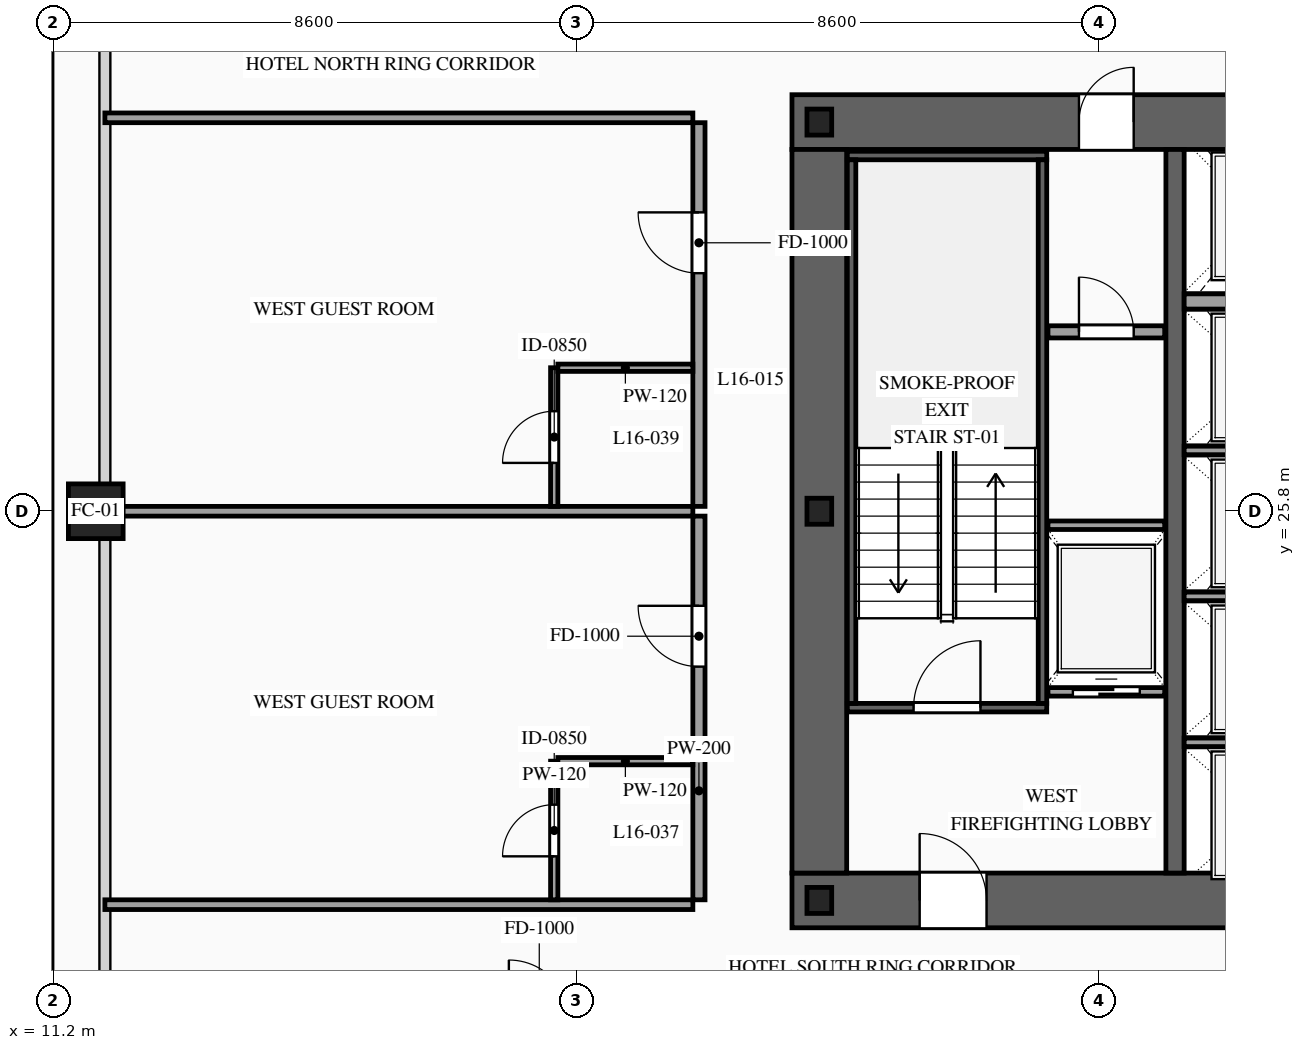
"""IFC4 building model, lengths in metres.
Left out: names, types, materials, properties, quantities, classifications, styles, units other than length and angle.
Written with IfcOpenShell. Run it as: python <this file> out.ifc"""

import sys

from ifc_helpers import new_model, si_unit, direction, frame, frame_2d, origin, origin_2d, place, context, subcontext, project, spatial, rectangle, hollow_rectangle, i_section, extrude, source, transform, mapped, element, fill, save


model = new_model("IFC4")
c1 = context("Model", 3, precision=1e-05, world=origin(), true_north=direction((0.0, 1.0)))
c2 = subcontext(c1, "Body", "Model", "MODEL_VIEW")
j1 = project(units=[si_unit("LENGTHUNIT", "METRE"), si_unit("PLANEANGLEUNIT", "RADIAN")], contexts=[c1])
p1 = place(None, origin())
s1 = spatial("IfcSite", under=j1, at=p1, CompositionType="ELEMENT")
p2 = place(p1, origin())
s2 = spatial("IfcBuilding", under=s1, at=p2, CompositionType="ELEMENT")
p3 = place(p2, frame((0.0, 0.0, 64.0)))
s3 = spatial("IfcBuildingStorey", under=s2, at=p3, CompositionType="ELEMENT", Elevation=64.0)
p4 = place(p3, frame((23.35, 19.4, 0.0), z_axis=(0.0, 0.0, 1.0), x_axis=(1.0, 0.0, 0.0)))
e1 = element("IfcWall", 1, at=p4, inside=s3, PredefinedType="SHEAR", context=c2, shape_type="SweptSolid", body=[
    extrude(rectangle(XDim=27.3, YDim=0.9, at=frame_2d((13.65, 0.0))), origin(), (0.0, 0.0, 1.0), 3.6),
])
p5 = place(p4, frame((2.1, 0.0, 0.0)))
e2 = element("IfcOpeningElement", 2, at=p5, cuts=e1, PredefinedType="OPENING", context=c2, shape_type="SweptSolid", body=[
    extrude(rectangle(XDim=1.1, YDim=2.2, at=frame_2d((0.55, 1.1))), frame((0.0, 0.465, 0.0), z_axis=(0.0, -1.0, 0.0), x_axis=(1.0, 0.0, 0.0)), (0.0, 0.0, 1.0), 0.93),
])
p6 = place(p4, frame((10.0, 0.0, 0.0)))
e3 = element("IfcOpeningElement", 3, at=p6, cuts=e1, PredefinedType="OPENING", context=c2, shape_type="SweptSolid", body=[
    extrude(rectangle(XDim=1.1, YDim=2.2, at=frame_2d((0.55, 1.1))), frame((0.0, 0.465, 0.0), z_axis=(0.0, -1.0, 0.0), x_axis=(1.0, 0.0, 0.0)), (0.0, 0.0, 1.0), 0.93),
])
p7 = place(p4, frame((23.2, 0.0, 0.0)))
e4 = element("IfcOpeningElement", 4, at=p7, cuts=e1, PredefinedType="OPENING", context=c2, shape_type="SweptSolid", body=[
    extrude(rectangle(XDim=1.1, YDim=2.2, at=frame_2d((0.55, 1.1))), frame((0.0, 0.465, 0.0), z_axis=(0.0, -1.0, 0.0), x_axis=(1.0, 0.0, 0.0)), (0.0, 0.0, 1.0), 0.93),
])
p8 = place(p4, frame((19.82, 0.0, 0.0)))
e5 = element("IfcOpeningElement", 5, at=p8, cuts=e1, PredefinedType="OPENING", context=c2, shape_type="SweptSolid", body=[
    extrude(rectangle(XDim=0.9, YDim=2.15, at=frame_2d((0.45, 1.075))), frame((0.0, 0.465, 0.0), z_axis=(0.0, -1.0, 0.0), x_axis=(1.0, 0.0, 0.0)), (0.0, 0.0, 1.0), 0.93),
])
p9 = place(p4, frame((18.38, 0.0, 0.0)))
e6 = element("IfcOpeningElement", 6, at=p9, cuts=e1, PredefinedType="OPENING", context=c2, shape_type="SweptSolid", body=[
    extrude(rectangle(XDim=0.9, YDim=2.15, at=frame_2d((0.45, 1.075))), frame((0.0, 0.465, 0.0), z_axis=(0.0, -1.0, 0.0), x_axis=(1.0, 0.0, 0.0)), (0.0, 0.0, 1.0), 0.93),
])
p10 = place(p3, frame((23.35, 32.2, 0.0), z_axis=(0.0, 0.0, 1.0), x_axis=(1.0, 0.0, 0.0)))
e7 = element("IfcWall", 7, at=p10, inside=s3, PredefinedType="SHEAR", context=c2, shape_type="SweptSolid", body=[
    extrude(rectangle(XDim=27.3, YDim=0.9, at=frame_2d((13.65, 0.0))), origin(), (0.0, 0.0, 1.0), 3.6),
])
p11 = place(p10, frame((4.72, 0.0, 0.0)))
e8 = element("IfcOpeningElement", 8, at=p11, cuts=e7, PredefinedType="OPENING", context=c2, shape_type="SweptSolid", body=[
    extrude(rectangle(XDim=0.9, YDim=2.15, at=frame_2d((0.45, 1.075))), frame((0.0, 0.465, 0.0), z_axis=(0.0, -1.0, 0.0), x_axis=(1.0, 0.0, 0.0)), (0.0, 0.0, 1.0), 0.93),
])
p12 = place(p10, frame((10.0, 0.0, 0.0)))
e9 = element("IfcOpeningElement", 9, at=p12, cuts=e7, PredefinedType="OPENING", context=c2, shape_type="SweptSolid", body=[
    extrude(rectangle(XDim=1.1, YDim=2.2, at=frame_2d((0.55, 1.1))), frame((0.0, 0.465, 0.0), z_axis=(0.0, -1.0, 0.0), x_axis=(1.0, 0.0, 0.0)), (0.0, 0.0, 1.0), 0.93),
])
p13 = place(p10, frame((15.85, 0.0, 0.0)))
e10 = element("IfcOpeningElement", 10, at=p13, cuts=e7, PredefinedType="OPENING", context=c2, shape_type="SweptSolid", body=[
    extrude(rectangle(XDim=1.1, YDim=2.2, at=frame_2d((0.55, 1.1))), frame((0.0, 0.465, 0.0), z_axis=(0.0, -1.0, 0.0), x_axis=(1.0, 0.0, 0.0)), (0.0, 0.0, 1.0), 0.93),
])
p14 = place(p10, frame((19.82, 0.0, 0.0)))
e11 = element("IfcOpeningElement", 11, at=p14, cuts=e7, PredefinedType="OPENING", context=c2, shape_type="SweptSolid", body=[
    extrude(rectangle(XDim=0.9, YDim=2.15, at=frame_2d((0.45, 1.075))), frame((0.0, 0.465, 0.0), z_axis=(0.0, -1.0, 0.0), x_axis=(1.0, 0.0, 0.0)), (0.0, 0.0, 1.0), 0.93),
])
m1 = source(origin(), c2, "Body", "SweptSolid", [
    extrude(rectangle(XDim=11.9, YDim=0.9, at=frame_2d((5.95, 0.0))), origin(), (0.0, 0.0, 1.0), 3.6),
])
p15 = place(p3, frame((23.8, 19.85, 0.0), z_axis=(0.0, 0.0, 1.0), x_axis=(0.0, 1.0, 0.0)))
e12 = element("IfcWall", 12, at=p15, inside=s3, PredefinedType="SHEAR", context=c2, shape_type="MappedRepresentation", body=[
    mapped(m1, transform((0.0, 0.0, 0.0), scale=1.0)),
])
m2 = source(origin(), c2, "Body", "SweptSolid", [
    extrude(rectangle(XDim=11.9, YDim=0.3, at=frame_2d((5.95, 0.0))), origin(), (0.0, 0.0, 1.0), 3.6),
])
p16 = place(p3, frame((29.65, 19.85, 0.0), z_axis=(0.0, 0.0, 1.0), x_axis=(0.0, 1.0, 0.0)))
e13 = element("IfcWall", 13, at=p16, inside=s3, PredefinedType="SOLIDWALL", context=c2, shape_type="MappedRepresentation", body=[
    mapped(m2, transform((0.0, 0.0, 0.0), scale=1.0)),
])
m3 = source(origin(), c2, "Body", "SweptSolid", [
    extrude(i_section(OverallWidth=0.407, OverallDepth=0.428, WebThickness=0.02, FlangeThickness=0.035, at=origin_2d()), origin(), (0.0, 0.0, 1.0), 3.6),
])
for number, where, z_axis, x_axis in (
    (14, (23.8, 19.4, 0.0), (0.0, 0.0, 1.0), (1.0, 0.0, 0.0)),
    (15, (23.8, 25.8, 0.0), (0.0, 0.0, 1.0), (1.0, 0.0, 0.0)),
    (16, (23.8, 32.2, 0.0), (0.0, 0.0, 1.0), (1.0, 0.0, 0.0)),
):
    element("IfcColumn", number, at=place(p3, frame(where, z_axis=z_axis, x_axis=x_axis)), inside=s3, PredefinedType="COLUMN", context=c2, shape_type="MappedRepresentation", body=[
        mapped(m3, transform((0.0, 0.0, 0.0), scale=1.0)),
    ])
m4 = source(origin(), c2, "Body", "SweptSolid", [
    extrude(hollow_rectangle(XDim=0.9, YDim=0.9, WallThickness=0.042, at=origin_2d()), origin(), (0.0, 0.0, 1.0), 3.6),
])
p17 = place(p3, frame((11.9, 25.8, 0.0), z_axis=(0.0, 0.0, 1.0), x_axis=(1.0, 0.0, 0.0)))
e17 = element("IfcColumn", 17, at=p17, inside=s3, PredefinedType="COLUMN", context=c2, shape_type="MappedRepresentation", body=[
    mapped(m4, transform((0.0, 0.0, 0.0), scale=1.0)),
])
p18 = place(p3, frame((27.56, 22.83, 0.0), z_axis=(0.0, 0.0, 1.0), x_axis=(1.0, 0.0, 0.0)))
e18 = element("IfcWall", 18, at=p18, inside=s3, PredefinedType="SOLIDWALL", context=c2, shape_type="SweptSolid", body=[
    extrude(rectangle(XDim=1.92, YDim=0.14, at=frame_2d((0.96, 0.0))), origin(), (0.0, 0.0, 1.0), 3.38),
])
p19 = place(p18, frame((0.41, 0.0, 0.0)))
e19 = element("IfcOpeningElement", 19, at=p19, cuts=e18, PredefinedType="OPENING", context=c2, shape_type="SweptSolid", body=[
    extrude(rectangle(XDim=1.1, YDim=2.2, at=frame_2d((0.55, 1.1))), frame((0.0, 0.085, 0.0), z_axis=(0.0, -1.0, 0.0), x_axis=(1.0, 0.0, 0.0)), (0.0, 0.0, 1.0), 0.17),
])
m5 = source(origin(), c2, "Body", "SweptSolid", [
    extrude(rectangle(XDim=1.92, YDim=0.14, at=frame_2d((0.96, 0.0))), origin(), (0.0, 0.0, 1.0), 3.38),
])
p20 = place(p3, frame((27.56, 25.57, 0.0), z_axis=(0.0, 0.0, 1.0), x_axis=(1.0, 0.0, 0.0)))
e20 = element("IfcWall", 20, at=p20, inside=s3, PredefinedType="SOLIDWALL", context=c2, shape_type="MappedRepresentation", body=[
    mapped(m5, transform((0.0, 0.0, 0.0), scale=1.0)),
])
m6 = source(origin(), c2, "Body", "SweptSolid", [
    extrude(rectangle(XDim=2.5, YDim=0.14, at=frame_2d((1.25, 0.0))), origin(), (0.0, 0.0, 1.0), 3.38),
])
for number, where, z_axis, x_axis in (
    (21, (29.8, 22.0, 0.0), (0.0, 0.0, 1.0), (1.0, 0.0, 0.0)),
    (22, (29.8, 24.4, 0.0), (0.0, 0.0, 1.0), (1.0, 0.0, 0.0)),
    (23, (29.8, 26.8, 0.0), (0.0, 0.0, 1.0), (1.0, 0.0, 0.0)),
):
    element("IfcWall", number, at=place(p3, frame(where, z_axis=z_axis, x_axis=x_axis)), inside=s3, PredefinedType="SOLIDWALL", context=c2, shape_type="MappedRepresentation", body=[
        mapped(m6, transform((0.0, 0.0, 0.0), scale=1.0)),
    ])
m7 = source(origin(), c2, "Body", "SweptSolid", [
    extrude(rectangle(XDim=2.5, YDim=0.25, at=frame_2d((1.25, 0.0))), origin(), (0.0, 0.0, 1.0), 3.38),
])
p21 = place(p3, frame((29.8, 29.25, 0.0), z_axis=(0.0, 0.0, 1.0), x_axis=(1.0, 0.0, 0.0)))
e24 = element("IfcWall", 24, at=p21, inside=s3, PredefinedType="SOLIDWALL", context=c2, shape_type="MappedRepresentation", body=[
    mapped(m7, transform((0.0, 0.0, 0.0), scale=1.0)),
])
p22 = place(p3, frame((24.26, 22.57, 0.0), z_axis=(0.0, 0.0, 1.0), x_axis=(1.0, 0.0, 0.0)))
e25 = element("IfcWall", 25, at=p22, inside=s3, PredefinedType="SOLIDWALL", context=c2, shape_type="SweptSolid", body=[
    extrude(rectangle(XDim=3.28, YDim=0.14, at=frame_2d((1.64, 0.0))), origin(), (0.0, 0.0, 1.0), 3.38),
])
p23 = place(p22, frame((1.09, 0.0, 0.0)))
e26 = element("IfcOpeningElement", 26, at=p23, cuts=e25, PredefinedType="OPENING", context=c2, shape_type="SweptSolid", body=[
    extrude(rectangle(XDim=1.1, YDim=2.2, at=frame_2d((0.55, 1.1))), frame((0.0, 0.085, 0.0), z_axis=(0.0, -1.0, 0.0), x_axis=(1.0, 0.0, 0.0)), (0.0, 0.0, 1.0), 0.17),
])
m8 = source(origin(), c2, "Body", "SweptSolid", [
    extrude(rectangle(XDim=3.28, YDim=0.14, at=frame_2d((1.64, 0.0))), origin(), (0.0, 0.0, 1.0), 3.38),
])
p24 = place(p3, frame((24.26, 31.65, 0.0), z_axis=(0.0, 0.0, 1.0), x_axis=(1.0, 0.0, 0.0)))
e27 = element("IfcWall", 27, at=p24, inside=s3, PredefinedType="SOLIDWALL", context=c2, shape_type="MappedRepresentation", body=[
    mapped(m8, transform((0.0, 0.0, 0.0), scale=1.0)),
])
m9 = source(origin(), c2, "Body", "SweptSolid", [
    extrude(rectangle(XDim=8.94, YDim=0.14, at=frame_2d((4.47, 0.0))), origin(), (0.0, 0.0, 1.0), 3.38),
])
for number, where, z_axis, x_axis in (
    (28, (24.33, 22.64, 0.0), (0.0, 0.0, 1.0), (0.0, 1.0, 0.0)),
    (29, (27.47, 22.64, 0.0), (0.0, 0.0, 1.0), (0.0, 1.0, 0.0)),
):
    element("IfcWall", number, at=place(p3, frame(where, z_axis=z_axis, x_axis=x_axis)), inside=s3, PredefinedType="SOLIDWALL", context=c2, shape_type="MappedRepresentation", body=[
        mapped(m9, transform((0.0, 0.0, 0.0), scale=1.0)),
    ])
p25 = place(p3, frame((27.56, 28.75, 0.0), z_axis=(0.0, 0.0, 1.0), x_axis=(1.0, 0.0, 0.0)))
e30 = element("IfcWall", 30, at=p25, inside=s3, PredefinedType="PARTITIONING", context=c2, shape_type="SweptSolid", body=[
    extrude(rectangle(XDim=1.92, YDim=0.2, at=frame_2d((0.96, 0.0))), origin(), (0.0, 0.0, 1.0), 3.38),
])
p26 = place(p25, frame((0.51, 0.0, 0.0)))
e31 = element("IfcOpeningElement", 31, at=p26, cuts=e30, PredefinedType="OPENING", context=c2, shape_type="SweptSolid", body=[
    extrude(rectangle(XDim=0.9, YDim=2.15, at=frame_2d((0.45, 1.075))), frame((0.0, 0.115, 0.0), z_axis=(0.0, -1.0, 0.0), x_axis=(1.0, 0.0, 0.0)), (0.0, 0.0, 1.0), 0.23),
])
p27 = place(p3, frame((21.82, 19.41, 0.0), z_axis=(0.0, 0.0, 1.0), x_axis=(0.0, 1.0, 0.0)))
e32 = element("IfcWall", 32, at=p27, inside=s3, PredefinedType="PARTITIONING", context=c2, shape_type="SweptSolid", body=[
    extrude(rectangle(XDim=6.31, YDim=0.2, at=frame_2d((3.155, 0.0))), origin(), (0.0, 0.0, 1.0), 3.38),
])
p28 = place(p27, frame((3.835, 0.0, 0.0)))
e33 = element("IfcOpeningElement", 33, at=p28, cuts=e32, PredefinedType="OPENING", context=c2, shape_type="SweptSolid", body=[
    extrude(rectangle(XDim=1.0, YDim=2.2, at=frame_2d((0.5, 1.1))), frame((0.0, 0.115, 0.0), z_axis=(0.0, -1.0, 0.0), x_axis=(1.0, 0.0, 0.0)), (0.0, 0.0, 1.0), 0.23),
])
m10 = source(origin(), c2, "Body", "SweptSolid", [
    extrude(rectangle(XDim=9.67, YDim=0.16, at=frame_2d((4.835, 0.0))), origin(), (0.0, 0.0, 1.0), 2.575),
])
p29 = place(p3, frame((12.05, 25.8, 0.0), z_axis=(0.0, 0.0, 1.0), x_axis=(1.0, 0.0, 0.0)))
e34 = element("IfcWall", 34, at=p29, inside=s3, PredefinedType="PARTITIONING", context=c2, shape_type="MappedRepresentation", body=[
    mapped(m10, transform((0.0, 0.0, 0.0), scale=1.0)),
])
m11 = source(origin(), c2, "Body", "SweptSolid", [
    extrude(rectangle(XDim=9.67, YDim=0.16, at=frame_2d((4.835, 0.0))), origin(), (0.0, 0.0, 1.0), 2.875),
])
p30 = place(p3, frame((12.05, 19.33, 0.0), z_axis=(0.0, 0.0, 1.0), x_axis=(1.0, 0.0, 0.0)))
e35 = element("IfcWall", 35, at=p30, inside=s3, PredefinedType="PARTITIONING", context=c2, shape_type="MappedRepresentation", body=[
    mapped(m11, transform((0.0, 0.0, 0.0), scale=1.0)),
])
p31 = place(p3, frame((19.44, 19.41, 0.0), z_axis=(0.0, 0.0, 1.0), x_axis=(0.0, 1.0, 0.0)))
e36 = element("IfcWall", 36, at=p31, inside=s3, PredefinedType="PARTITIONING", context=c2, shape_type="SweptSolid", body=[
    extrude(rectangle(XDim=2.28, YDim=0.12, at=frame_2d((1.14, 0.0))), origin(), (0.0, 0.0, 1.0), 3.38),
])
p32 = place(p31, frame((0.715, 0.0, 0.0)))
e37 = element("IfcOpeningElement", 37, at=p32, cuts=e36, PredefinedType="OPENING", context=c2, shape_type="SweptSolid", body=[
    extrude(rectangle(XDim=0.85, YDim=2.1, at=frame_2d((0.425, 1.05))), frame((0.0, 0.075, 0.0), z_axis=(0.0, -1.0, 0.0), x_axis=(1.0, 0.0, 0.0)), (0.0, 0.0, 1.0), 0.15),
])
m12 = source(origin(), c2, "Body", "SweptSolid", [
    extrude(rectangle(XDim=2.22, YDim=0.12, at=frame_2d((1.11, 0.0))), origin(), (0.0, 0.0, 1.0), 3.38),
])
p33 = place(p3, frame((19.5, 21.69, 0.0), z_axis=(0.0, 0.0, 1.0), x_axis=(1.0, 0.0, 0.0)))
e38 = element("IfcWall", 38, at=p33, inside=s3, PredefinedType="PARTITIONING", context=c2, shape_type="MappedRepresentation", body=[
    mapped(m12, transform((0.0, 0.0, 0.0), scale=1.0)),
])
p34 = place(p3, frame((21.82, 25.88, 0.0), z_axis=(0.0, 0.0, 1.0), x_axis=(0.0, 1.0, 0.0)))
e39 = element("IfcWall", 39, at=p34, inside=s3, PredefinedType="PARTITIONING", context=c2, shape_type="SweptSolid", body=[
    extrude(rectangle(XDim=6.31, YDim=0.2, at=frame_2d((3.155, 0.0))), origin(), (0.0, 0.0, 1.0), 3.38),
])
p35 = place(p34, frame((3.835, 0.0, 0.0)))
e40 = element("IfcOpeningElement", 40, at=p35, cuts=e39, PredefinedType="OPENING", context=c2, shape_type="SweptSolid", body=[
    extrude(rectangle(XDim=1.0, YDim=2.2, at=frame_2d((0.5, 1.1))), frame((0.0, 0.115, 0.0), z_axis=(0.0, -1.0, 0.0), x_axis=(1.0, 0.0, 0.0)), (0.0, 0.0, 1.0), 0.23),
])
p36 = place(p3, frame((12.05, 32.27, 0.0), z_axis=(0.0, 0.0, 1.0), x_axis=(1.0, 0.0, 0.0)))
e41 = element("IfcWall", 41, at=p36, inside=s3, PredefinedType="PARTITIONING", context=c2, shape_type="MappedRepresentation", body=[
    mapped(m11, transform((0.0, 0.0, 0.0), scale=1.0)),
])
p37 = place(p3, frame((19.44, 25.88, 0.0), z_axis=(0.0, 0.0, 1.0), x_axis=(0.0, 1.0, 0.0)))
e42 = element("IfcWall", 42, at=p37, inside=s3, PredefinedType="PARTITIONING", context=c2, shape_type="SweptSolid", body=[
    extrude(rectangle(XDim=2.28, YDim=0.12, at=frame_2d((1.14, 0.0))), origin(), (0.0, 0.0, 1.0), 3.38),
])
p38 = place(p37, frame((0.715, 0.0, 0.0)))
e43 = element("IfcOpeningElement", 43, at=p38, cuts=e42, PredefinedType="OPENING", context=c2, shape_type="SweptSolid", body=[
    extrude(rectangle(XDim=0.85, YDim=2.1, at=frame_2d((0.425, 1.05))), frame((0.0, 0.075, 0.0), z_axis=(0.0, -1.0, 0.0), x_axis=(1.0, 0.0, 0.0)), (0.0, 0.0, 1.0), 0.15),
])
p39 = place(p3, frame((19.5, 28.16, 0.0), z_axis=(0.0, 0.0, 1.0), x_axis=(1.0, 0.0, 0.0)))
e44 = element("IfcWall", 44, at=p39, inside=s3, PredefinedType="PARTITIONING", context=c2, shape_type="MappedRepresentation", body=[
    mapped(m12, transform((0.0, 0.0, 0.0), scale=1.0)),
])
m13 = source(origin(), c2, "Body", "SweptSolid", [
    extrude(rectangle(XDim=1.1, YDim=2.2, at=frame_2d((0.55, 1.1))), frame((0.0, 0.025, 0.0), z_axis=(0.0, -1.0, 0.0), x_axis=(1.0, 0.0, 0.0)), (0.0, 0.0, 1.0), 0.05),
])
p40 = place(p19, origin())
e45 = element("IfcDoor", 45, at=p40, inside=s3, OperationType="SLIDING_TO_LEFT", PredefinedType="DOOR", context=c2, shape_type="MappedRepresentation", body=[
    mapped(m13, transform((0.0, 0.0, 0.0), scale=1.0)),
])
fill(e19, e45)
m14 = source(origin(), c2, "Body", "SweptSolid", [
    extrude(rectangle(XDim=1.1, YDim=2.2, at=frame_2d((0.55, 1.1))), frame((0.0, 0.025, 0.0), z_axis=(0.0, -1.0, 0.0), x_axis=(1.0, 0.0, 0.0)), (0.0, 0.0, 1.0), 0.05),
])
p41 = place(p23, origin())
e46 = element("IfcDoor", 46, at=p41, inside=s3, OperationType="SINGLE_SWING_RIGHT", PredefinedType="DOOR", context=c2, shape_type="MappedRepresentation", body=[
    mapped(m14, transform((0.0, 0.0, 0.0), scale=1.0)),
])
fill(e26, e46)
p42 = place(p5, origin())
e47 = element("IfcDoor", 47, at=p42, inside=s3, OperationType="SINGLE_SWING_LEFT", PredefinedType="DOOR", context=c2, shape_type="MappedRepresentation", body=[
    mapped(m14, transform((0.0, 0.0, 0.0), scale=1.0)),
])
fill(e2, e47)
m15 = source(origin(), c2, "Body", "SweptSolid", [
    extrude(rectangle(XDim=0.9, YDim=2.15, at=frame_2d((0.45, 1.075))), frame((0.0, 0.025, 0.0), z_axis=(0.0, -1.0, 0.0), x_axis=(1.0, 0.0, 0.0)), (0.0, 0.0, 1.0), 0.05),
])
p43 = place(p11, origin())
e48 = element("IfcDoor", 48, at=p43, inside=s3, OperationType="SINGLE_SWING_RIGHT", PredefinedType="DOOR", context=c2, shape_type="MappedRepresentation", body=[
    mapped(m15, transform((0.0, 0.0, 0.0), scale=1.0)),
])
fill(e8, e48)
p44 = place(p26, origin())
e49 = element("IfcDoor", 49, at=p44, inside=s3, OperationType="SINGLE_SWING_LEFT", PredefinedType="DOOR", context=c2, shape_type="MappedRepresentation", body=[
    mapped(m15, transform((0.0, 0.0, 0.0), scale=1.0)),
])
fill(e31, e49)
m16 = source(origin(), c2, "Body", "SweptSolid", [
    extrude(rectangle(XDim=1.0, YDim=2.2, at=frame_2d((0.5, 1.1))), frame((0.0, 0.025, 0.0), z_axis=(0.0, -1.0, 0.0), x_axis=(1.0, 0.0, 0.0)), (0.0, 0.0, 1.0), 0.05),
])
p45 = place(p28, origin())
e50 = element("IfcDoor", 50, at=p45, inside=s3, OperationType="SINGLE_SWING_RIGHT", PredefinedType="DOOR", context=c2, shape_type="MappedRepresentation", body=[
    mapped(m16, transform((0.0, 0.0, 0.0), scale=1.0)),
])
fill(e33, e50)
m17 = source(origin(), c2, "Body", "SweptSolid", [
    extrude(rectangle(XDim=0.85, YDim=2.1, at=frame_2d((0.425, 1.05))), frame((0.0, 0.025, 0.0), z_axis=(0.0, -1.0, 0.0), x_axis=(1.0, 0.0, 0.0)), (0.0, 0.0, 1.0), 0.05),
])
p46 = place(p32, origin())
e51 = element("IfcDoor", 51, at=p46, inside=s3, OperationType="SINGLE_SWING_LEFT", PredefinedType="DOOR", context=c2, shape_type="MappedRepresentation", body=[
    mapped(m17, transform((0.0, 0.0, 0.0), scale=1.0)),
])
fill(e37, e51)
p47 = place(p35, origin())
e52 = element("IfcDoor", 52, at=p47, inside=s3, OperationType="SINGLE_SWING_RIGHT", PredefinedType="DOOR", context=c2, shape_type="MappedRepresentation", body=[
    mapped(m16, transform((0.0, 0.0, 0.0), scale=1.0)),
])
fill(e40, e52)
p48 = place(p38, origin())
e53 = element("IfcDoor", 53, at=p48, inside=s3, OperationType="SINGLE_SWING_LEFT", PredefinedType="DOOR", context=c2, shape_type="MappedRepresentation", body=[
    mapped(m17, transform((0.0, 0.0, 0.0), scale=1.0)),
])
fill(e43, e53)
save(model, sys.argv[1])
